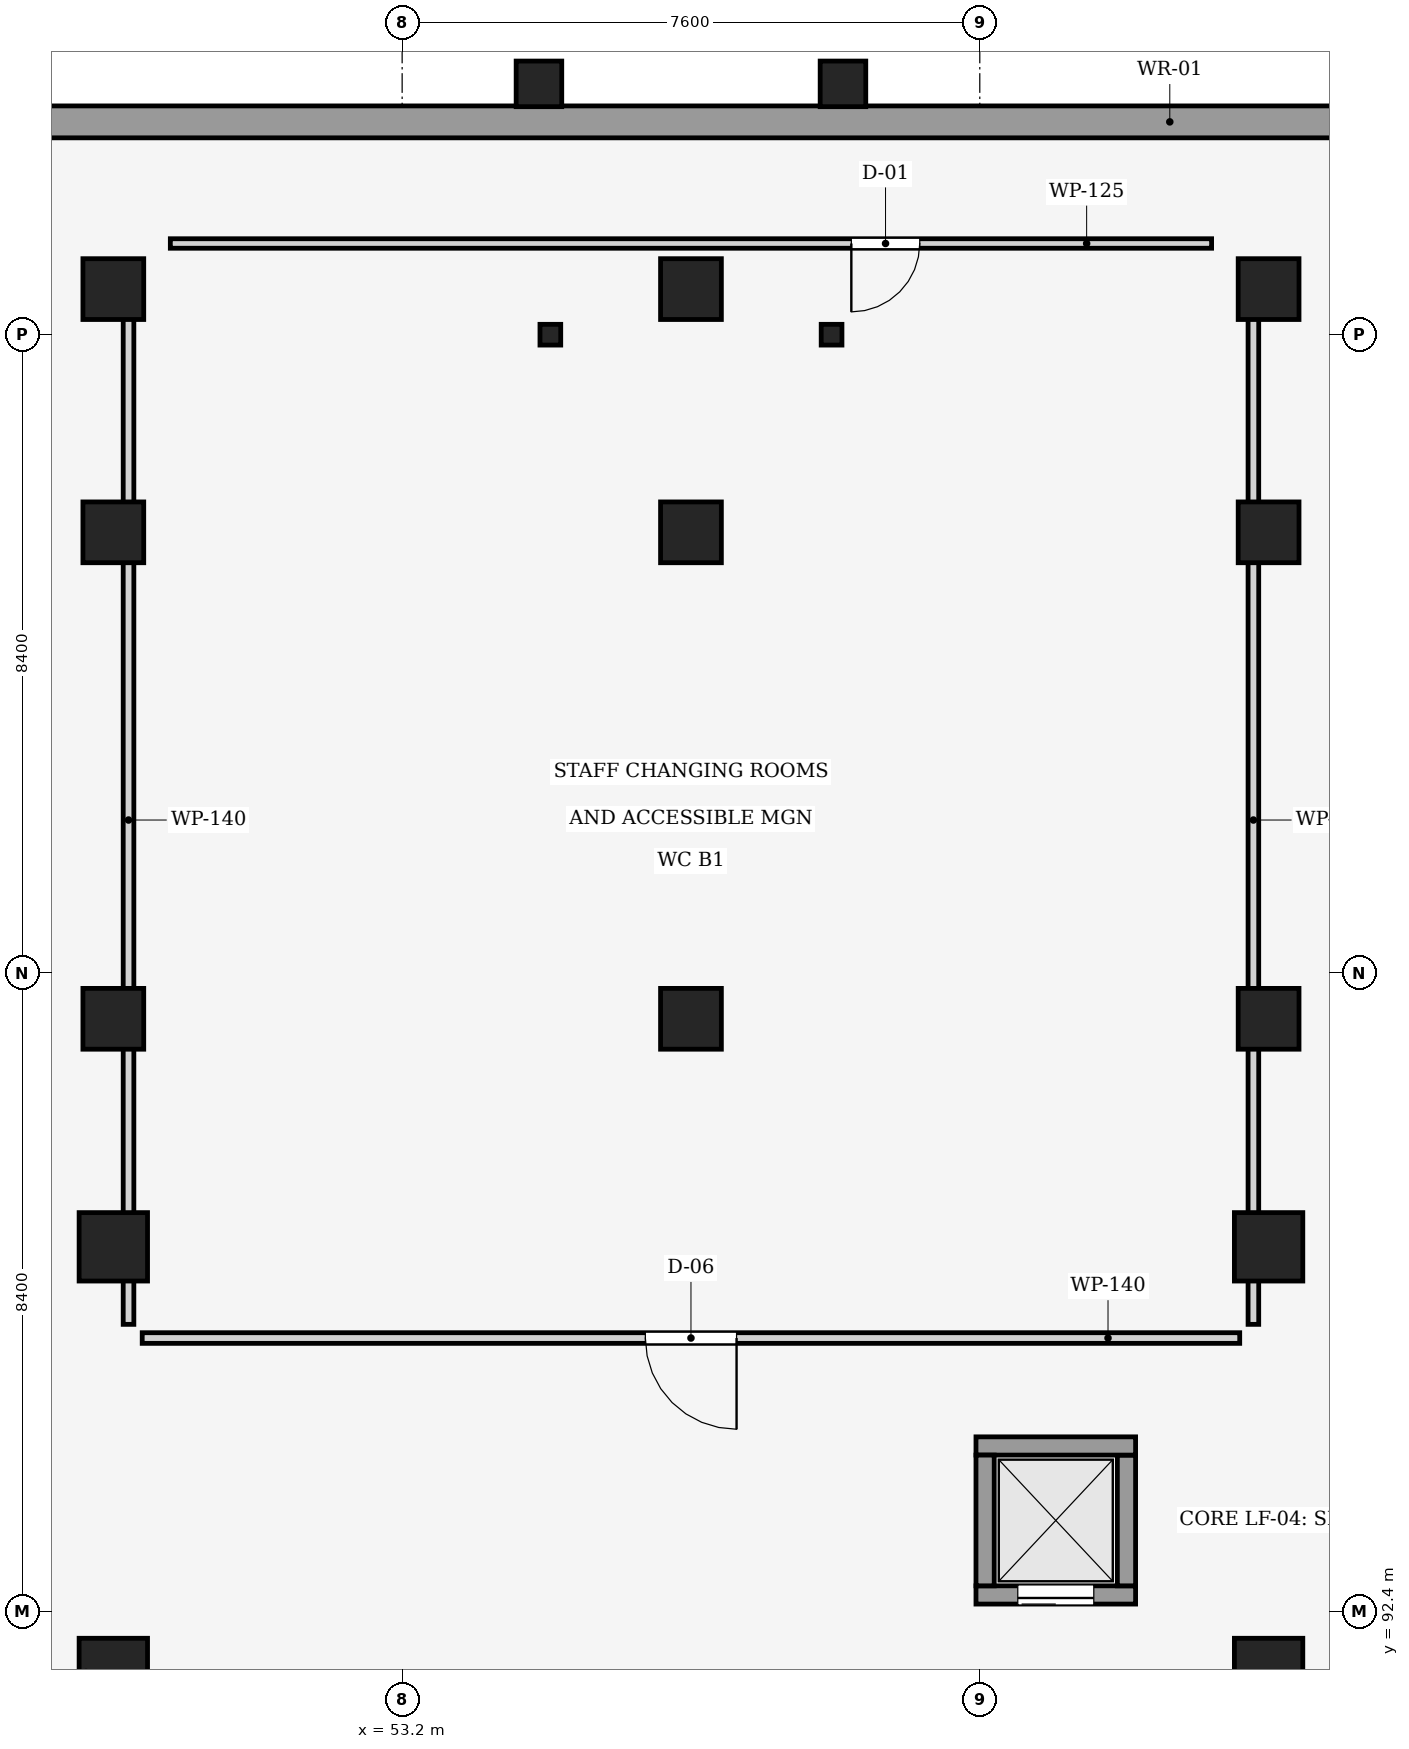
"""IFC4 building model, lengths in metres.
Left out: names, types, materials, properties, quantities, classifications, styles, units other than length and angle.
Written with IfcOpenShell. Run it as: python <this file> out.ifc"""

import sys

from ifc_helpers import new_model, si_unit, direction, frame, frame_2d, origin, origin_2d, place, context, subcontext, project, spatial, rectangle, hollow_circle, extrude, element, fill, save


model = new_model("IFC4")
c1 = context("Model", 3, precision=1e-05, world=origin(), true_north=direction((0.0, 1.0)))
c2 = subcontext(c1, "Body", "Model", "MODEL_VIEW")
j1 = project(units=[si_unit("LENGTHUNIT", "METRE"), si_unit("PLANEANGLEUNIT", "RADIAN")], contexts=[c1])
p1 = place(None, origin())
s1 = spatial("IfcSite", under=j1, at=p1, CompositionType="ELEMENT")
p2 = place(p1, origin())
s2 = spatial("IfcBuilding", under=s1, at=p2, CompositionType="ELEMENT")
p3 = place(p2, frame((0.0, 0.0, -4.2)))
s3 = spatial("IfcBuildingStorey", under=s2, at=p3, CompositionType="ELEMENT", Elevation=-4.2)
for number, where, z_axis, x_axis in (
    (1, (49.4, 91.6, 0.0), (0.0, 0.0, 1.0), (1.0, 0.0, 0.0)),
    (2, (49.4, 97.2, 0.0), (0.0, 0.0, 1.0), (1.0, 0.0, 0.0)),
    (3, (64.6, 91.6, 0.0), (0.0, 0.0, 1.0), (1.0, 0.0, 0.0)),
    (4, (64.6, 97.2, 0.0), (0.0, 0.0, 1.0), (1.0, 0.0, 0.0)),
):
    element("IfcColumn", number, at=place(p3, frame(where, z_axis=z_axis, x_axis=x_axis)), inside=s3, PredefinedType="COLUMN", context=c2, shape_type="SweptSolid", body=[
        extrude(rectangle(XDim=0.9, YDim=0.9, at=origin_2d()), origin(), (0.0, 0.0, 1.0), 4.2),
    ])
for number, where, z_axis, x_axis in (
    (5, (49.4, 100.2, 0.0), (0.0, 0.0, 1.0), (1.0, 0.0, 0.0)),
    (6, (57.0, 100.2, 0.0), (0.0, 0.0, 1.0), (1.0, 0.0, 0.0)),
    (7, (64.6, 100.2, 0.0), (0.0, 0.0, 1.0), (1.0, 0.0, 0.0)),
    (8, (49.4, 106.6, 0.0), (0.0, 0.0, 1.0), (1.0, 0.0, 0.0)),
    (9, (57.0, 106.6, 0.0), (0.0, 0.0, 1.0), (1.0, 0.0, 0.0)),
    (10, (64.6, 106.6, 0.0), (0.0, 0.0, 1.0), (1.0, 0.0, 0.0)),
    (11, (49.4, 109.8, 0.0), (0.0, 0.0, 1.0), (1.0, 0.0, 0.0)),
    (12, (57.0, 109.8, 0.0), (0.0, 0.0, 1.0), (1.0, 0.0, 0.0)),
    (13, (64.6, 109.8, 0.0), (0.0, 0.0, 1.0), (1.0, 0.0, 0.0)),
):
    element("IfcColumn", number, at=place(p3, frame(where, z_axis=z_axis, x_axis=x_axis)), inside=s3, PredefinedType="COLUMN", context=c2, shape_type="SweptSolid", body=[
        extrude(rectangle(XDim=0.8, YDim=0.8, at=origin_2d()), origin(), (0.0, 0.0, 1.0), 4.2),
    ])
for number, where, z_axis, x_axis in (
    (14, (55.15, 109.2, 0.0), (0.0, 0.0, 1.0), (1.0, 0.0, 0.0)),
    (15, (58.85, 109.2, 0.0), (0.0, 0.0, 1.0), (1.0, 0.0, 0.0)),
):
    element("IfcColumn", number, at=place(p3, frame(where, z_axis=z_axis, x_axis=x_axis)), inside=s3, PredefinedType="COLUMN", context=c2, shape_type="SweptSolid", body=[
        extrude(hollow_circle(Radius=0.136, WallThickness=0.016, at=origin_2d()), origin(), (0.0, 0.0, 1.0), 4.2),
    ])
for number, where, z_axis, x_axis in (
    (16, (55.0, 112.5, 0.0), (0.0, 0.0, 1.0), (1.0, 0.0, 0.0)),
    (17, (59.0, 112.5, 0.0), (0.0, 0.0, 1.0), (1.0, 0.0, 0.0)),
):
    element("IfcColumn", number, at=place(p3, frame(where, z_axis=z_axis, x_axis=x_axis)), inside=s3, PredefinedType="COLUMN", context=c2, shape_type="SweptSolid", body=[
        extrude(rectangle(XDim=0.6, YDim=0.6, at=origin_2d()), origin(), (0.0, 0.0, 1.0), 4.2),
    ])
p4 = place(p3, frame((30.62, 112.0, 0.0), z_axis=(0.0, 0.0, 1.0), x_axis=(1.0, 0.0, 0.0)))
e18 = element("IfcWall", 18, at=p4, inside=s3, PredefinedType="USERDEFINED", context=c2, shape_type="SweptSolid", body=[
    extrude(rectangle(XDim=65.36, YDim=0.42, at=frame_2d((32.68, 0.0))), origin(), (0.0, 0.0, 1.0), 3.75),
])
p5 = place(p3, frame((62.85, 92.62, 0.0), z_axis=(0.0, 0.0, 1.0), x_axis=(-1.0, 0.0, 0.0)))
e19 = element("IfcWall", 19, at=p5, inside=s3, PredefinedType="SHEAR", context=c2, shape_type="SweptSolid", body=[
    extrude(rectangle(XDim=2.1, YDim=0.24, at=frame_2d((1.05, 0.0))), origin(), (0.0, 0.0, 1.0), 4.2),
])
p6 = place(p5, frame((0.55, 0.0, 0.0)))
e20 = element("IfcOpeningElement", 20, at=p6, cuts=e19, PredefinedType="OPENING", context=c2, shape_type="SweptSolid", body=[
    extrude(rectangle(XDim=1.0, YDim=2.15, at=frame_2d((0.5, 1.075))), frame((0.0, 0.13, 0.0), z_axis=(0.0, -1.0, 0.0), x_axis=(1.0, 0.0, 0.0)), (0.0, 0.0, 1.0), 0.26),
])
p7 = place(p3, frame((62.73, 94.46, 0.0), z_axis=(0.0, 0.0, 1.0), x_axis=(0.0, -1.0, 0.0)))
e21 = element("IfcWall", 21, at=p7, inside=s3, PredefinedType="SHEAR", context=c2, shape_type="SweptSolid", body=[
    extrude(rectangle(XDim=1.72, YDim=0.24, at=frame_2d((0.86, 0.0))), origin(), (0.0, 0.0, 1.0), 4.2),
])
p8 = place(p3, frame((60.75, 94.58, 0.0), z_axis=(0.0, 0.0, 1.0), x_axis=(1.0, 0.0, 0.0)))
e22 = element("IfcWall", 22, at=p8, inside=s3, PredefinedType="SHEAR", context=c2, shape_type="SweptSolid", body=[
    extrude(rectangle(XDim=2.1, YDim=0.24, at=frame_2d((1.05, 0.0))), origin(), (0.0, 0.0, 1.0), 4.2),
])
p9 = place(p3, frame((60.87, 92.74, 0.0), z_axis=(0.0, 0.0, 1.0), x_axis=(0.0, 1.0, 0.0)))
e23 = element("IfcWall", 23, at=p9, inside=s3, PredefinedType="SHEAR", context=c2, shape_type="SweptSolid", body=[
    extrude(rectangle(XDim=1.72, YDim=0.24, at=frame_2d((0.86, 0.0))), origin(), (0.0, 0.0, 1.0), 4.2),
])
p10 = place(p3, frame((64.22, 96.0, 0.0), z_axis=(0.0, 0.0, 1.0), x_axis=(-1.0, 0.0, 0.0)))
e24 = element("IfcWall", 24, at=p10, inside=s3, PredefinedType="PARTITIONING", context=c2, shape_type="SweptSolid", body=[
    extrude(rectangle(XDim=14.44, YDim=0.14, at=frame_2d((7.22, 0.0))), origin(), (0.0, 0.0, 1.0), 3.105),
])
p11 = place(p10, frame((6.62, 0.0, 0.0)))
e25 = element("IfcOpeningElement", 25, at=p11, cuts=e24, PredefinedType="OPENING", context=c2, shape_type="SweptSolid", body=[
    extrude(rectangle(XDim=1.2, YDim=2.1, at=frame_2d((0.6, 1.05))), frame((0.0, 0.08, 0.0), z_axis=(0.0, -1.0, 0.0), x_axis=(1.0, 0.0, 0.0)), (0.0, 0.0, 1.0), 0.16),
])
for number, where, z_axis, x_axis in (
    (26, (64.4, 109.45, 0.0), (0.0, 0.0, 1.0), (0.0, -1.0, 0.0)),
    (27, (49.6, 96.18, 0.0), (0.0, 0.0, 1.0), (0.0, 1.0, 0.0)),
):
    element("IfcWall", number, at=place(p3, frame(where, z_axis=z_axis, x_axis=x_axis)), inside=s3, PredefinedType="PARTITIONING", context=c2, shape_type="SweptSolid", body=[
        extrude(rectangle(XDim=13.27, YDim=0.14, at=frame_2d((6.635, 0.0))), origin(), (0.0, 0.0, 1.0), 3.105),
    ])
p12 = place(p3, frame((63.85, 110.4, 0.0), z_axis=(0.0, 0.0, 1.0), x_axis=(-1.0, 0.0, 0.0)))
e28 = element("IfcWall", 28, at=p12, inside=s3, PredefinedType="PARTITIONING", context=c2, shape_type="SweptSolid", body=[
    extrude(rectangle(XDim=13.7, YDim=0.125, at=frame_2d((6.85, 0.0))), origin(), (0.0, 0.0, 1.0), 3.79),
])
p13 = place(p12, frame((3.84, 0.0, 0.0)))
e29 = element("IfcOpeningElement", 29, at=p13, cuts=e28, PredefinedType="OPENING", context=c2, shape_type="SweptSolid", body=[
    extrude(rectangle(XDim=0.9, YDim=2.1, at=frame_2d((0.45, 1.05))), frame((0.0, 0.073, 0.0), z_axis=(0.0, -1.0, 0.0), x_axis=(1.0, 0.0, 0.0)), (0.0, 0.0, 1.0), 0.145),
])
p14 = place(p6, origin())
e30 = element("IfcDoor", 30, at=p14, inside=s3, OperationType="SLIDING_TO_RIGHT", PredefinedType="DOOR", context=c2, shape_type="SweptSolid", body=[
    extrude(rectangle(XDim=1.0, YDim=2.15, at=frame_2d((0.5, 1.075))), frame((0.0, 0.025, 0.0), z_axis=(0.0, -1.0, 0.0), x_axis=(1.0, 0.0, 0.0)), (0.0, 0.0, 1.0), 0.05),
])
fill(e20, e30)
p15 = place(p11, origin())
e31 = element("IfcDoor", 31, at=p15, inside=s3, OperationType="SINGLE_SWING_LEFT", PredefinedType="DOOR", context=c2, shape_type="SweptSolid", body=[
    extrude(rectangle(XDim=1.2, YDim=2.1, at=frame_2d((0.6, 1.05))), frame((0.0, 0.025, 0.0), z_axis=(0.0, -1.0, 0.0), x_axis=(1.0, 0.0, 0.0)), (0.0, 0.0, 1.0), 0.05),
])
fill(e25, e31)
p16 = place(p13, origin())
e32 = element("IfcDoor", 32, at=p16, inside=s3, OperationType="SINGLE_SWING_RIGHT", PredefinedType="DOOR", context=c2, shape_type="SweptSolid", body=[
    extrude(rectangle(XDim=0.9, YDim=2.1, at=frame_2d((0.45, 1.05))), frame((0.0, 0.025, 0.0), z_axis=(0.0, -1.0, 0.0), x_axis=(1.0, 0.0, 0.0)), (0.0, 0.0, 1.0), 0.05),
])
fill(e29, e32)
save(model, sys.argv[1])
